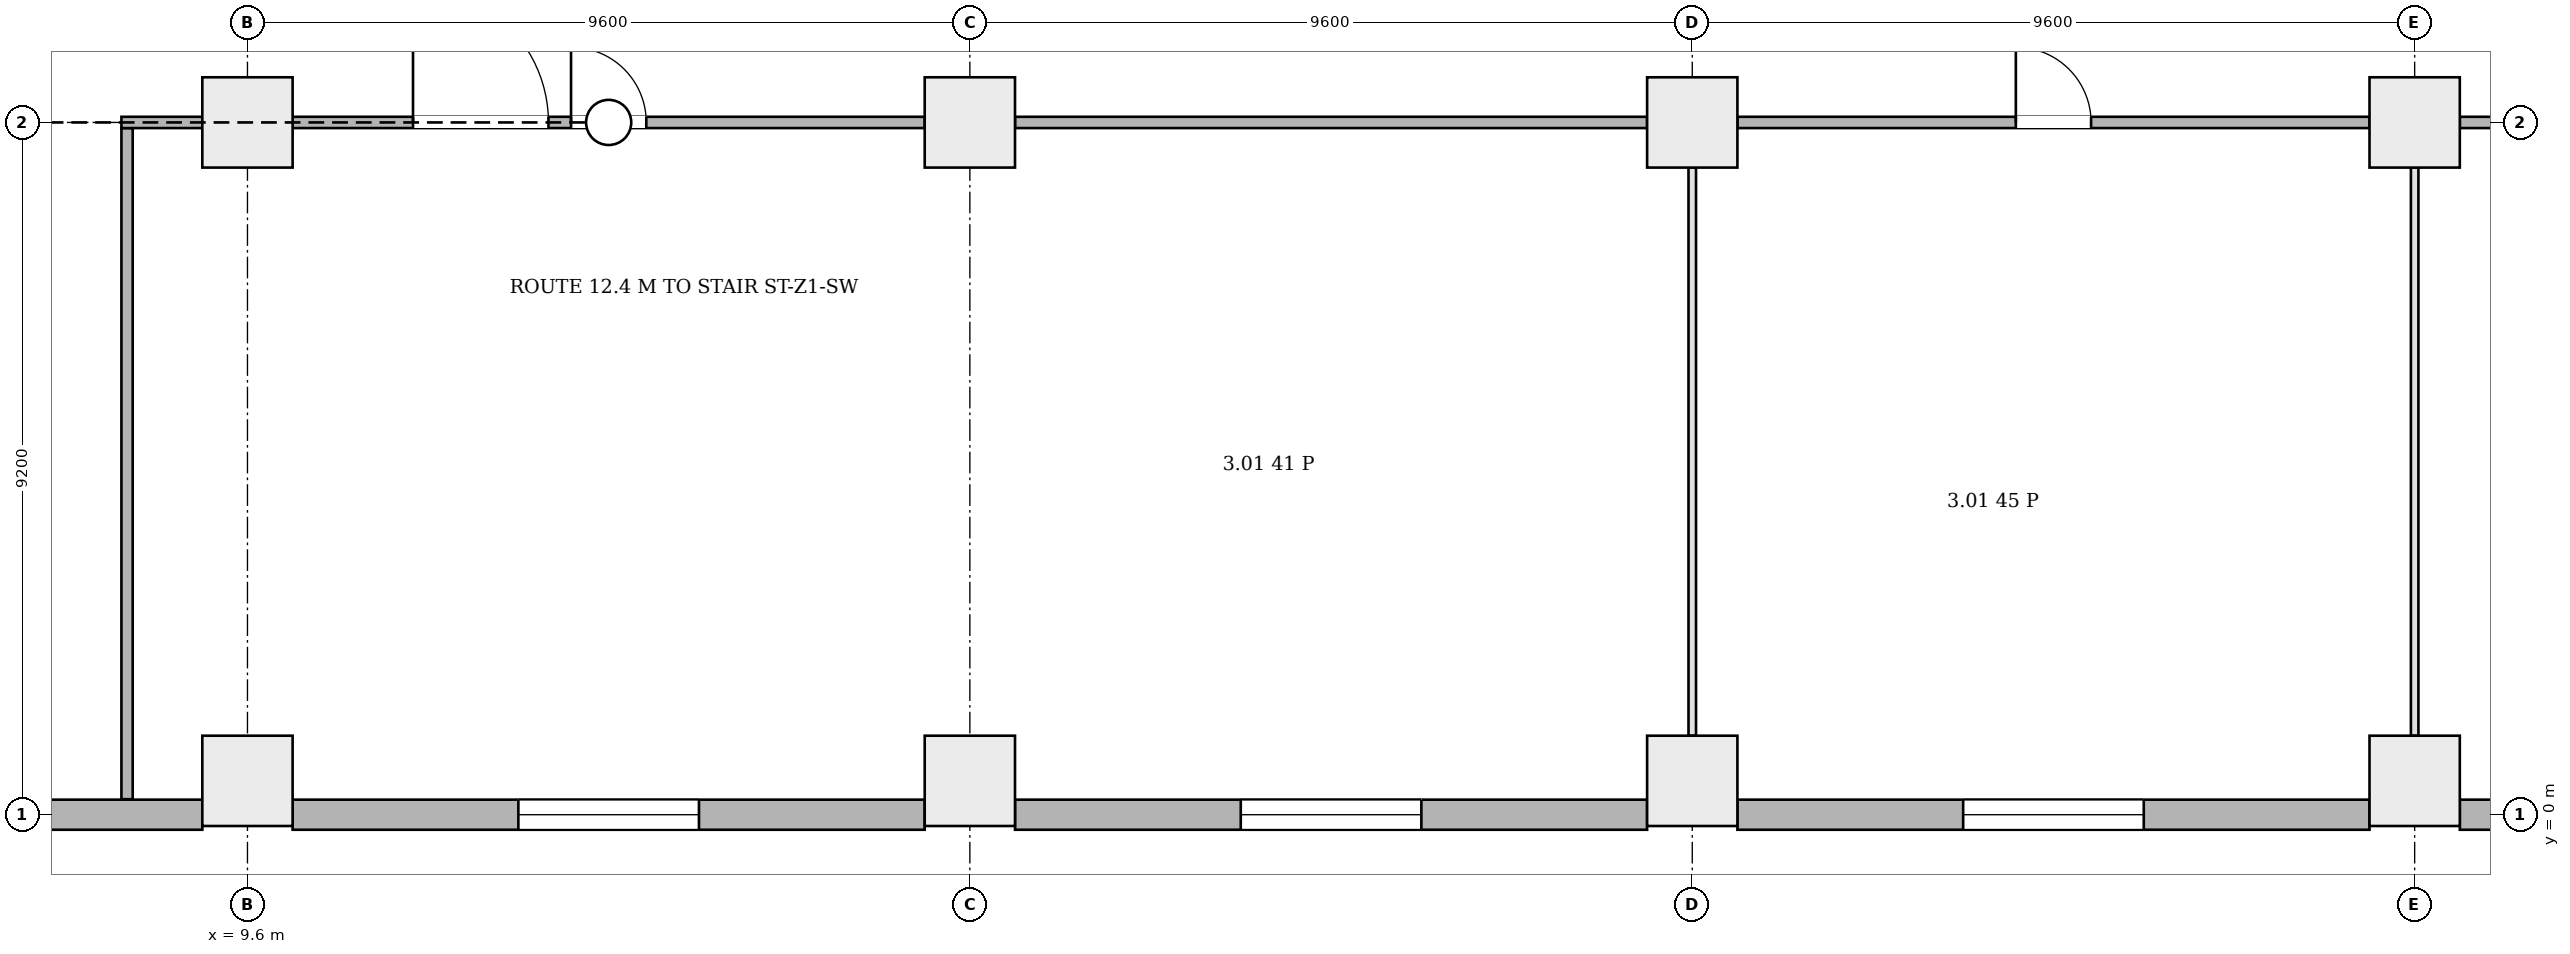
"""IFC4 building model, lengths in metres.
Left out: names, types, materials, properties, quantities, classifications, styles, units other than length and angle.
Written with IfcOpenShell. Run it as: python <this file> out.ifc"""

import sys

from ifc_helpers import new_model, si_unit, direction, frame, frame_2d, origin, origin_2d, place, context, subcontext, project, spatial, rectangle, extrude, element, fill, save


model = new_model("IFC4")
c1 = context("Model", 3, precision=1e-05, world=origin(), true_north=direction((0.0, 1.0)))
c2 = subcontext(c1, "Body", "Model", "MODEL_VIEW")
j1 = project(units=[si_unit("LENGTHUNIT", "METRE"), si_unit("PLANEANGLEUNIT", "RADIAN")], contexts=[c1])
p1 = place(None, origin())
s1 = spatial("IfcSite", under=j1, at=p1, CompositionType="ELEMENT")
p2 = place(p1, origin())
s2 = spatial("IfcBuilding", under=s1, at=p2, CompositionType="ELEMENT")
p3 = place(p2, frame((0.0, 0.0, 21.7)))
s3 = spatial("IfcBuildingStorey", under=s2, at=p3, CompositionType="ELEMENT", Elevation=21.7)
for number, where, z_axis, x_axis in (
    (1, (9.6, 0.45, 0.0), (0.0, 0.0, 1.0), (1.0, 0.0, 0.0)),
    (2, (19.2, 0.45, 0.0), (0.0, 0.0, 1.0), (1.0, 0.0, 0.0)),
    (3, (28.8, 0.45, 0.0), (0.0, 0.0, 1.0), (1.0, 0.0, 0.0)),
    (4, (38.4, 0.45, 0.0), (0.0, 0.0, 1.0), (1.0, 0.0, 0.0)),
    (5, (9.6, 9.2, 0.0), (0.0, 0.0, 1.0), (1.0, 0.0, 0.0)),
    (6, (19.2, 9.2, 0.0), (0.0, 0.0, 1.0), (1.0, 0.0, 0.0)),
    (7, (28.8, 9.2, 0.0), (0.0, 0.0, 1.0), (1.0, 0.0, 0.0)),
    (8, (38.4, 9.2, 0.0), (0.0, 0.0, 1.0), (1.0, 0.0, 0.0)),
):
    element("IfcColumn", number, at=place(p3, frame(where, z_axis=z_axis, x_axis=x_axis)), inside=s3, PredefinedType="COLUMN", context=c2, shape_type="SweptSolid", body=[
        extrude(rectangle(XDim=1.2, YDim=1.2, at=origin_2d()), origin(), (0.0, 0.0, 1.0), 5.0),
    ])
p4 = place(p3, frame((0.2, 0.0, 0.0), z_axis=(0.0, 0.0, 1.0), x_axis=(1.0, 0.0, 0.0)))
e9 = element("IfcWall", 9, at=p4, inside=s3, PredefinedType="ELEMENTEDWALL", context=c2, shape_type="SweptSolid", body=[
    extrude(rectangle(XDim=8.8, YDim=0.4, at=frame_2d((4.4, 0.0))), origin(), (0.0, 0.0, 1.0), 4.65),
])
p5 = place(p4, frame((3.4, 0.0, 1.0)))
e10 = element("IfcOpeningElement", 10, at=p5, cuts=e9, PredefinedType="OPENING", context=c2, shape_type="SweptSolid", body=[
    extrude(rectangle(XDim=2.4, YDim=2.2, at=frame_2d((1.2, 1.1))), frame((0.0, 0.21, 0.0), z_axis=(0.0, -1.0, 0.0), x_axis=(1.0, 0.0, 0.0)), (0.0, 0.0, 1.0), 0.42),
])
p6 = place(p3, frame((10.2, 0.0, 0.0), z_axis=(0.0, 0.0, 1.0), x_axis=(1.0, 0.0, 0.0)))
e11 = element("IfcWall", 11, at=p6, inside=s3, PredefinedType="ELEMENTEDWALL", context=c2, shape_type="SweptSolid", body=[
    extrude(rectangle(XDim=8.4, YDim=0.4, at=frame_2d((4.2, 0.0))), origin(), (0.0, 0.0, 1.0), 4.65),
])
p7 = place(p6, frame((3.0, 0.0, 1.0)))
e12 = element("IfcOpeningElement", 12, at=p7, cuts=e11, PredefinedType="OPENING", context=c2, shape_type="SweptSolid", body=[
    extrude(rectangle(XDim=2.4, YDim=2.2, at=frame_2d((1.2, 1.1))), frame((0.0, 0.21, 0.0), z_axis=(0.0, -1.0, 0.0), x_axis=(1.0, 0.0, 0.0)), (0.0, 0.0, 1.0), 0.42),
])
p8 = place(p3, frame((19.8, 0.0, 0.0), z_axis=(0.0, 0.0, 1.0), x_axis=(1.0, 0.0, 0.0)))
e13 = element("IfcWall", 13, at=p8, inside=s3, PredefinedType="ELEMENTEDWALL", context=c2, shape_type="SweptSolid", body=[
    extrude(rectangle(XDim=8.4, YDim=0.4, at=frame_2d((4.2, 0.0))), origin(), (0.0, 0.0, 1.0), 4.65),
])
p9 = place(p8, frame((3.0, 0.0, 1.0)))
e14 = element("IfcOpeningElement", 14, at=p9, cuts=e13, PredefinedType="OPENING", context=c2, shape_type="SweptSolid", body=[
    extrude(rectangle(XDim=2.4, YDim=2.2, at=frame_2d((1.2, 1.1))), frame((0.0, 0.21, 0.0), z_axis=(0.0, -1.0, 0.0), x_axis=(1.0, 0.0, 0.0)), (0.0, 0.0, 1.0), 0.42),
])
p10 = place(p3, frame((29.4, 0.0, 0.0), z_axis=(0.0, 0.0, 1.0), x_axis=(1.0, 0.0, 0.0)))
e15 = element("IfcWall", 15, at=p10, inside=s3, PredefinedType="ELEMENTEDWALL", context=c2, shape_type="SweptSolid", body=[
    extrude(rectangle(XDim=8.4, YDim=0.4, at=frame_2d((4.2, 0.0))), origin(), (0.0, 0.0, 1.0), 4.65),
])
p11 = place(p10, frame((3.0, 0.0, 1.0)))
e16 = element("IfcOpeningElement", 16, at=p11, cuts=e15, PredefinedType="OPENING", context=c2, shape_type="SweptSolid", body=[
    extrude(rectangle(XDim=2.4, YDim=2.2, at=frame_2d((1.2, 1.1))), frame((0.0, 0.21, 0.0), z_axis=(0.0, -1.0, 0.0), x_axis=(1.0, 0.0, 0.0)), (0.0, 0.0, 1.0), 0.42),
])
p12 = place(p3, frame((39.0, 0.0, 0.0), z_axis=(0.0, 0.0, 1.0), x_axis=(1.0, 0.0, 0.0)))
e17 = element("IfcWall", 17, at=p12, inside=s3, PredefinedType="ELEMENTEDWALL", context=c2, shape_type="SweptSolid", body=[
    extrude(rectangle(XDim=8.4, YDim=0.4, at=frame_2d((4.2, 0.0))), origin(), (0.0, 0.0, 1.0), 4.65),
])
p13 = place(p12, frame((3.0, 0.0, 1.0)))
e18 = element("IfcOpeningElement", 18, at=p13, cuts=e17, PredefinedType="OPENING", context=c2, shape_type="SweptSolid", body=[
    extrude(rectangle(XDim=2.4, YDim=2.2, at=frame_2d((1.2, 1.1))), frame((0.0, 0.21, 0.0), z_axis=(0.0, -1.0, 0.0), x_axis=(1.0, 0.0, 0.0)), (0.0, 0.0, 1.0), 0.42),
])
p14 = place(p3, frame((8.0, 0.206, 0.0), z_axis=(0.0, 0.0, 1.0), x_axis=(0.0, 1.0, 0.0)))
e19 = element("IfcWall", 19, at=p14, inside=s3, PredefinedType="PARTITIONING", context=c2, shape_type="SweptSolid", body=[
    extrude(rectangle(XDim=8.919, YDim=0.15, at=frame_2d((4.459, 0.0))), origin(), (0.0, 0.0, 1.0), 4.65),
])
p15 = place(p3, frame((7.925, 9.2, 0.0), z_axis=(0.0, 0.0, 1.0), x_axis=(1.0, 0.0, 0.0)))
e20 = element("IfcWall", 20, at=p15, inside=s3, PredefinedType="PARTITIONING", context=c2, shape_type="SweptSolid", body=[
    extrude(rectangle(XDim=1.075, YDim=0.15, at=frame_2d((0.538, 0.0))), origin(), (0.0, 0.0, 1.0), 4.25),
])
p16 = place(p3, frame((10.2, 9.2, 0.0), z_axis=(0.0, 0.0, 1.0), x_axis=(1.0, 0.0, 0.0)))
e21 = element("IfcWall", 21, at=p16, inside=s3, PredefinedType="PARTITIONING", context=c2, shape_type="SweptSolid", body=[
    extrude(rectangle(XDim=8.4, YDim=0.15, at=frame_2d((4.2, 0.0))), origin(), (0.0, 0.0, 1.0), 4.25),
])
p17 = place(p16, frame((3.7, 0.0, 0.0)))
e22 = element("IfcOpeningElement", 22, at=p17, cuts=e21, PredefinedType="OPENING", context=c2, shape_type="SweptSolid", body=[
    extrude(rectangle(XDim=1.0, YDim=2.1, at=frame_2d((0.5, 1.05))), frame((0.0, 0.085, 0.0), z_axis=(0.0, -1.0, 0.0), x_axis=(1.0, 0.0, 0.0)), (0.0, 0.0, 1.0), 0.17),
])
p18 = place(p16, frame((1.6, 0.0, 0.0)))
e23 = element("IfcOpeningElement", 23, at=p18, cuts=e21, PredefinedType="OPENING", context=c2, shape_type="SweptSolid", body=[
    extrude(rectangle(XDim=1.8, YDim=2.1, at=frame_2d((0.9, 1.05))), frame((0.0, 0.085, 0.0), z_axis=(0.0, -1.0, 0.0), x_axis=(1.0, 0.0, 0.0)), (0.0, 0.0, 1.0), 0.17),
])
p19 = place(p3, frame((19.8, 9.2, 0.0), z_axis=(0.0, 0.0, 1.0), x_axis=(1.0, 0.0, 0.0)))
e24 = element("IfcWall", 24, at=p19, inside=s3, PredefinedType="PARTITIONING", context=c2, shape_type="SweptSolid", body=[
    extrude(rectangle(XDim=8.4, YDim=0.15, at=frame_2d((4.2, 0.0))), origin(), (0.0, 0.0, 1.0), 4.25),
])
p20 = place(p3, frame((28.8, 1.05, 0.0), z_axis=(0.0, 0.0, 1.0), x_axis=(0.0, 1.0, 0.0)))
e25 = element("IfcWall", 25, at=p20, inside=s3, PredefinedType="PARTITIONING", context=c2, shape_type="SweptSolid", body=[
    extrude(rectangle(XDim=7.55, YDim=0.1, at=frame_2d((3.775, 0.0))), origin(), (0.0, 0.0, 1.0), 4.25),
])
p21 = place(p3, frame((29.4, 9.2, 0.0), z_axis=(0.0, 0.0, 1.0), x_axis=(1.0, 0.0, 0.0)))
e26 = element("IfcWall", 26, at=p21, inside=s3, PredefinedType="PARTITIONING", context=c2, shape_type="SweptSolid", body=[
    extrude(rectangle(XDim=8.4, YDim=0.15, at=frame_2d((4.2, 0.0))), origin(), (0.0, 0.0, 1.0), 4.25),
])
p22 = place(p21, frame((3.7, 0.0, 0.0)))
e27 = element("IfcOpeningElement", 27, at=p22, cuts=e26, PredefinedType="OPENING", context=c2, shape_type="SweptSolid", body=[
    extrude(rectangle(XDim=1.0, YDim=2.1, at=frame_2d((0.5, 1.05))), frame((0.0, 0.085, 0.0), z_axis=(0.0, -1.0, 0.0), x_axis=(1.0, 0.0, 0.0)), (0.0, 0.0, 1.0), 0.17),
])
p23 = place(p3, frame((38.4, 1.05, 0.0), z_axis=(0.0, 0.0, 1.0), x_axis=(0.0, 1.0, 0.0)))
e28 = element("IfcWall", 28, at=p23, inside=s3, PredefinedType="PARTITIONING", context=c2, shape_type="SweptSolid", body=[
    extrude(rectangle(XDim=7.55, YDim=0.1, at=frame_2d((3.775, 0.0))), origin(), (0.0, 0.0, 1.0), 4.25),
])
p24 = place(p3, frame((39.0, 9.2, 0.0), z_axis=(0.0, 0.0, 1.0), x_axis=(1.0, 0.0, 0.0)))
e29 = element("IfcWall", 29, at=p24, inside=s3, PredefinedType="PARTITIONING", context=c2, shape_type="SweptSolid", body=[
    extrude(rectangle(XDim=8.4, YDim=0.15, at=frame_2d((4.2, 0.0))), origin(), (0.0, 0.0, 1.0), 4.25),
])
p25 = place(p24, frame((3.7, 0.0, 0.0)))
e30 = element("IfcOpeningElement", 30, at=p25, cuts=e29, PredefinedType="OPENING", context=c2, shape_type="SweptSolid", body=[
    extrude(rectangle(XDim=1.0, YDim=2.1, at=frame_2d((0.5, 1.05))), frame((0.0, 0.085, 0.0), z_axis=(0.0, -1.0, 0.0), x_axis=(1.0, 0.0, 0.0)), (0.0, 0.0, 1.0), 0.17),
])
p26 = place(p7, origin())
e31 = element("IfcWindow", 31, at=p26, inside=s3, PartitioningType="SINGLE_PANEL", PredefinedType="WINDOW", context=c2, shape_type="SweptSolid", body=[
    extrude(rectangle(XDim=2.4, YDim=2.2, at=frame_2d((1.2, 1.1))), frame((0.0, 0.03, 0.0), z_axis=(0.0, -1.0, 0.0), x_axis=(1.0, 0.0, 0.0)), (0.0, 0.0, 1.0), 0.06),
])
fill(e12, e31)
p27 = place(p9, origin())
e32 = element("IfcWindow", 32, at=p27, inside=s3, PartitioningType="SINGLE_PANEL", PredefinedType="WINDOW", context=c2, shape_type="SweptSolid", body=[
    extrude(rectangle(XDim=2.4, YDim=2.2, at=frame_2d((1.2, 1.1))), frame((0.0, 0.03, 0.0), z_axis=(0.0, -1.0, 0.0), x_axis=(1.0, 0.0, 0.0)), (0.0, 0.0, 1.0), 0.06),
])
fill(e14, e32)
p28 = place(p11, origin())
e33 = element("IfcWindow", 33, at=p28, inside=s3, PartitioningType="SINGLE_PANEL", PredefinedType="WINDOW", context=c2, shape_type="SweptSolid", body=[
    extrude(rectangle(XDim=2.4, YDim=2.2, at=frame_2d((1.2, 1.1))), frame((0.0, 0.03, 0.0), z_axis=(0.0, -1.0, 0.0), x_axis=(1.0, 0.0, 0.0)), (0.0, 0.0, 1.0), 0.06),
])
fill(e16, e33)
p29 = place(p17, origin())
e34 = element("IfcDoor", 34, at=p29, inside=s3, OperationType="SINGLE_SWING_LEFT", PredefinedType="DOOR", context=c2, shape_type="SweptSolid", body=[
    extrude(rectangle(XDim=1.0, YDim=2.1, at=frame_2d((0.5, 1.05))), frame((0.0, 0.025, 0.0), z_axis=(0.0, -1.0, 0.0), x_axis=(1.0, 0.0, 0.0)), (0.0, 0.0, 1.0), 0.05),
])
fill(e22, e34)
p30 = place(p22, origin())
e35 = element("IfcDoor", 35, at=p30, inside=s3, OperationType="SINGLE_SWING_LEFT", PredefinedType="DOOR", context=c2, shape_type="SweptSolid", body=[
    extrude(rectangle(XDim=1.0, YDim=2.1, at=frame_2d((0.5, 1.05))), frame((0.0, 0.025, 0.0), z_axis=(0.0, -1.0, 0.0), x_axis=(1.0, 0.0, 0.0)), (0.0, 0.0, 1.0), 0.05),
])
fill(e27, e35)
p31 = place(p18, origin())
e36 = element("IfcDoor", 36, at=p31, inside=s3, OperationType="DOUBLE_DOOR_SINGLE_SWING", PredefinedType="DOOR", context=c2, shape_type="SweptSolid", body=[
    extrude(rectangle(XDim=1.8, YDim=2.1, at=frame_2d((0.9, 1.05))), frame((0.0, 0.025, 0.0), z_axis=(0.0, -1.0, 0.0), x_axis=(1.0, 0.0, 0.0)), (0.0, 0.0, 1.0), 0.05),
])
fill(e23, e36)
save(model, sys.argv[1])
